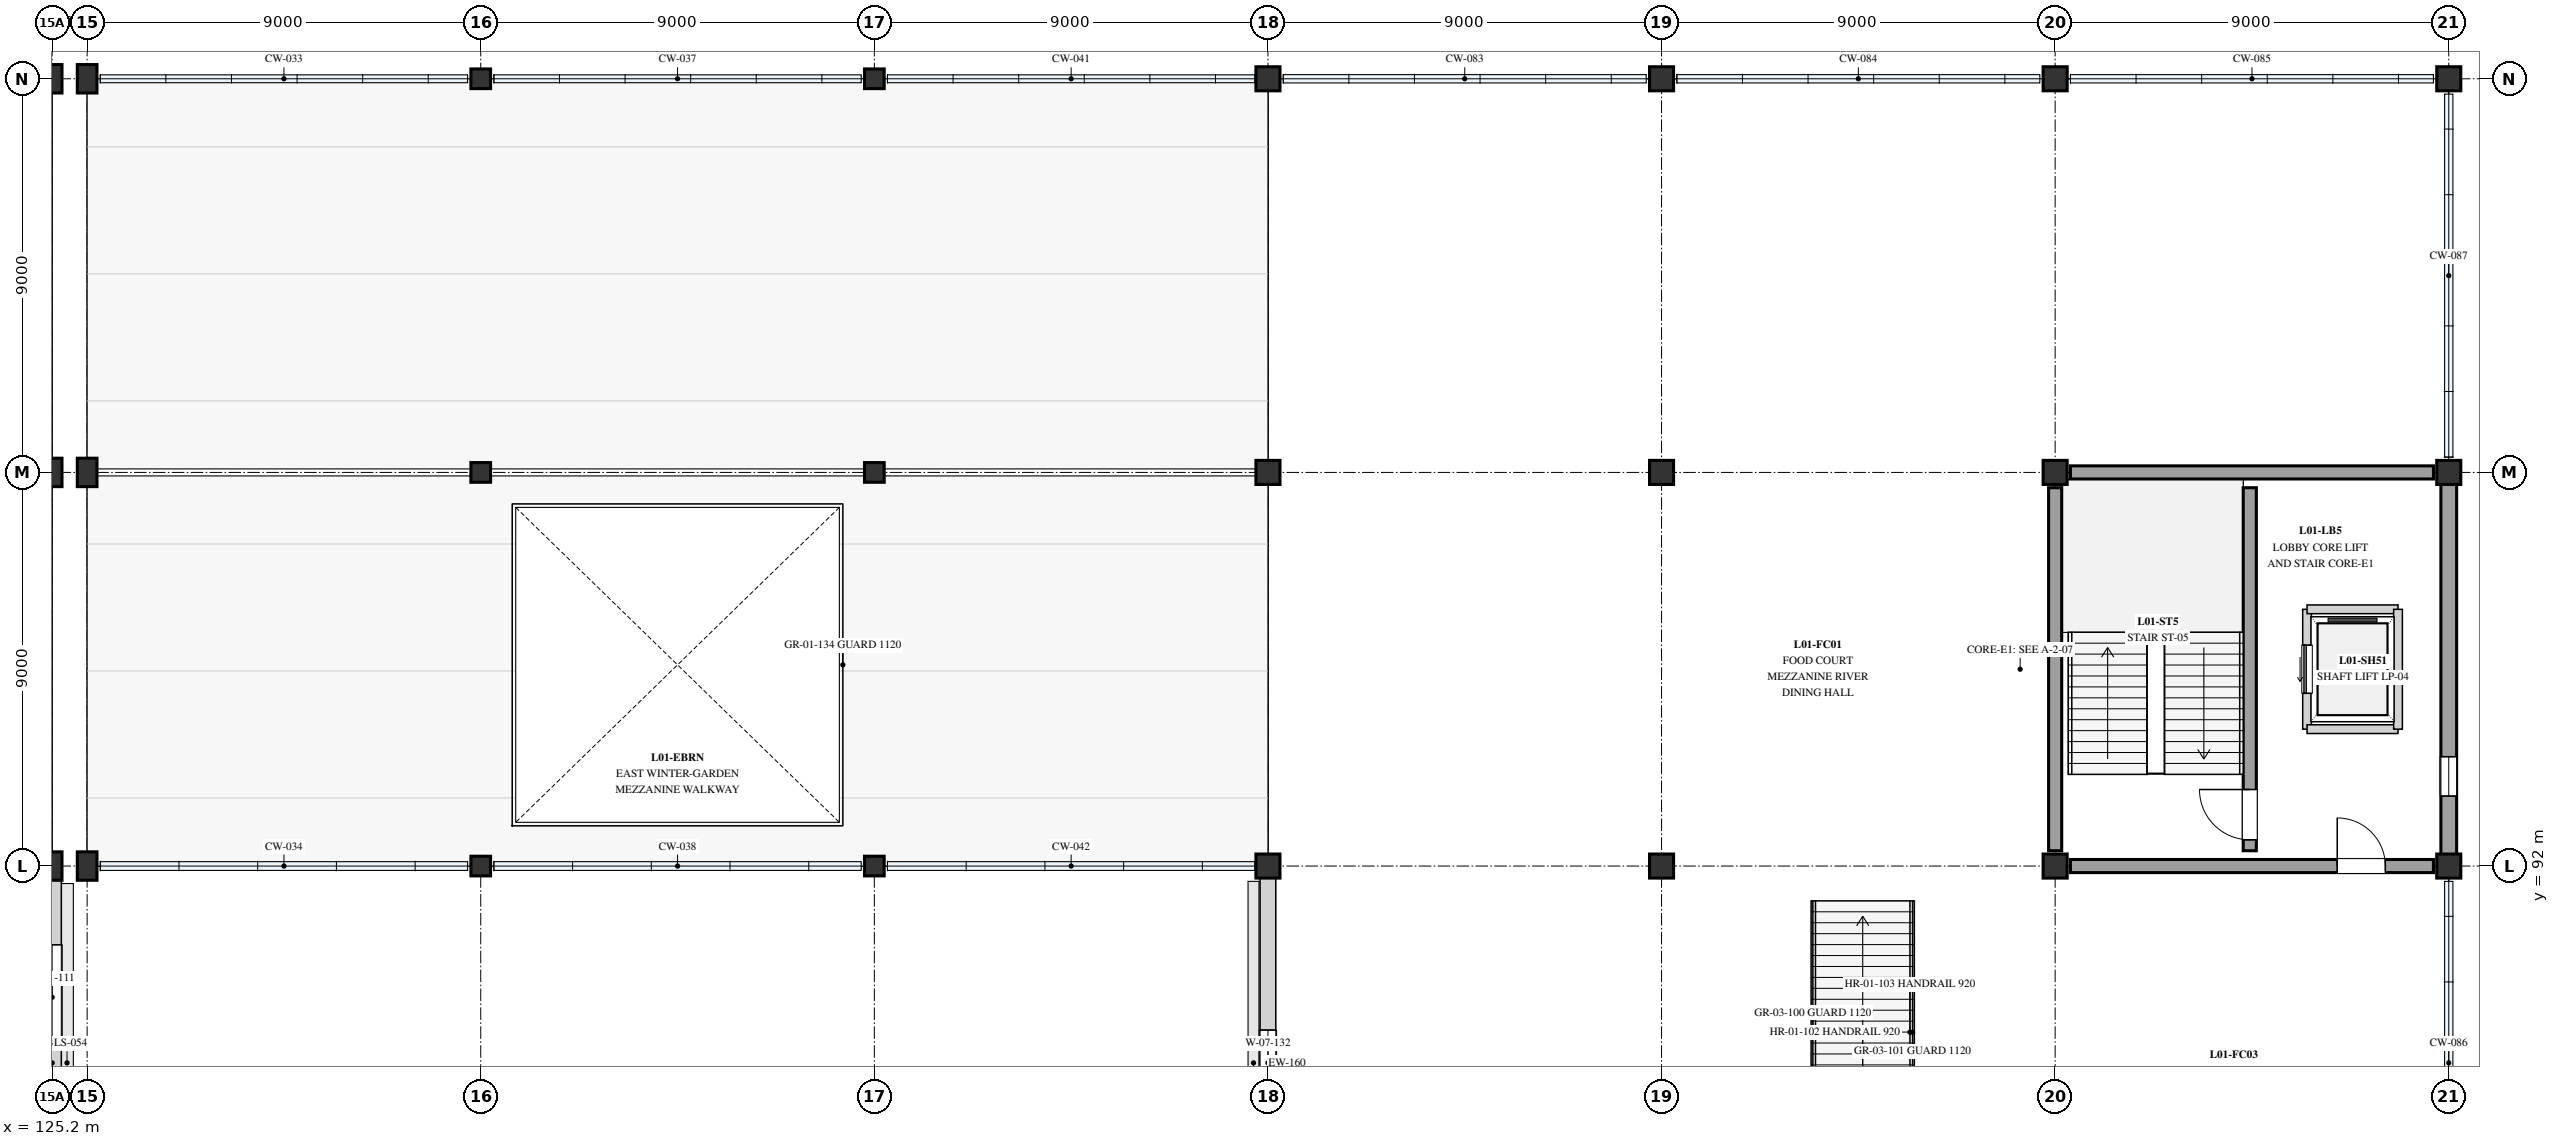
"""IFC4 building model, lengths in metres.
Left out: names, types, materials, properties, quantities, classifications, styles, units other than length and angle.
Written with IfcOpenShell. Run it as: python <this file> out.ifc"""

import sys

from ifc_helpers import new_model, si_unit, direction, frame, frame_2d, origin, origin_2d, place, context, subcontext, project, spatial, rectangle, extrude, element, fill, save


model = new_model("IFC4")
c1 = context("Model", 3, precision=1e-05, world=origin(), true_north=direction((0.0, 1.0)))
c2 = subcontext(c1, "Body", "Model", "MODEL_VIEW")
j1 = project(units=[si_unit("LENGTHUNIT", "METRE"), si_unit("PLANEANGLEUNIT", "RADIAN")], contexts=[c1])
p1 = place(None, origin())
s1 = spatial("IfcSite", under=j1, at=p1, CompositionType="ELEMENT")
p2 = place(p1, origin())
s2 = spatial("IfcBuilding", under=s1, at=p2, CompositionType="ELEMENT")
p3 = place(p2, frame((0.0, 0.0, 4.5)))
s3 = spatial("IfcBuildingStorey", under=s2, at=p3, CompositionType="ELEMENT", Elevation=4.5)
p4 = place(p3, frame((125.2, 92.0, 0.0), z_axis=(0.0, 0.0, 1.0), x_axis=(1.0, 0.0, 0.0)))
e1 = element("IfcColumn", 1, at=p4, inside=s3, PredefinedType="COLUMN", context=c2, shape_type="SweptSolid", body=[
    extrude(rectangle(XDim=0.45, YDim=0.65, at=origin_2d()), origin(), (0.0, 0.0, 1.0), 3.9),
])
p5 = place(p3, frame((125.2, 101.0, 0.0), z_axis=(0.0, 0.0, 1.0), x_axis=(1.0, 0.0, 0.0)))
e2 = element("IfcColumn", 2, at=p5, inside=s3, PredefinedType="COLUMN", context=c2, shape_type="SweptSolid", body=[
    extrude(rectangle(XDim=0.45, YDim=0.65, at=origin_2d()), origin(), (0.0, 0.0, 1.0), 5.71),
])
for number, where, z_axis, x_axis in (
    (3, (125.2, 110.0, 0.0), (0.0, 0.0, 1.0), (1.0, 0.0, 0.0)),
    (4, (126.0, 92.0, 0.0), (0.0, 0.0, 1.0), (1.0, 0.0, 0.0)),
):
    element("IfcColumn", number, at=place(p3, frame(where, z_axis=z_axis, x_axis=x_axis)), inside=s3, PredefinedType="COLUMN", context=c2, shape_type="SweptSolid", body=[
        extrude(rectangle(XDim=0.45, YDim=0.65, at=origin_2d()), origin(), (0.0, 0.0, 1.0), 3.71),
    ])
p6 = place(p3, frame((126.0, 101.0, 0.0), z_axis=(0.0, 0.0, 1.0), x_axis=(1.0, 0.0, 0.0)))
e5 = element("IfcColumn", 5, at=p6, inside=s3, PredefinedType="COLUMN", context=c2, shape_type="SweptSolid", body=[
    extrude(rectangle(XDim=0.45, YDim=0.65, at=origin_2d()), origin(), (0.0, 0.0, 1.0), 5.71),
])
p7 = place(p3, frame((126.0, 110.0, 0.0), z_axis=(0.0, 0.0, 1.0), x_axis=(1.0, 0.0, 0.0)))
e6 = element("IfcColumn", 6, at=p7, inside=s3, PredefinedType="COLUMN", context=c2, shape_type="SweptSolid", body=[
    extrude(rectangle(XDim=0.45, YDim=0.65, at=origin_2d()), origin(), (0.0, 0.0, 1.0), 3.71),
])
p8 = place(p3, frame((135.0, 92.0, 0.0), z_axis=(0.0, 0.0, 1.0), x_axis=(1.0, 0.0, 0.0)))
e7 = element("IfcColumn", 7, at=p8, inside=s3, PredefinedType="COLUMN", context=c2, shape_type="SweptSolid", body=[
    extrude(rectangle(XDim=0.45, YDim=0.45, at=origin_2d()), origin(), (0.0, 0.0, 1.0), 3.71),
])
p9 = place(p3, frame((135.0, 101.0, 0.0), z_axis=(0.0, 0.0, 1.0), x_axis=(1.0, 0.0, 0.0)))
e8 = element("IfcColumn", 8, at=p9, inside=s3, PredefinedType="COLUMN", context=c2, shape_type="SweptSolid", body=[
    extrude(rectangle(XDim=0.45, YDim=0.45, at=origin_2d()), origin(), (0.0, 0.0, 1.0), 5.71),
])
for number, where, z_axis, x_axis in (
    (9, (135.0, 110.0, 0.0), (0.0, 0.0, 1.0), (1.0, 0.0, 0.0)),
    (10, (144.0, 92.0, 0.0), (0.0, 0.0, 1.0), (1.0, 0.0, 0.0)),
):
    element("IfcColumn", number, at=place(p3, frame(where, z_axis=z_axis, x_axis=x_axis)), inside=s3, PredefinedType="COLUMN", context=c2, shape_type="SweptSolid", body=[
        extrude(rectangle(XDim=0.45, YDim=0.45, at=origin_2d()), origin(), (0.0, 0.0, 1.0), 3.71),
    ])
p10 = place(p3, frame((144.0, 101.0, 0.0), z_axis=(0.0, 0.0, 1.0), x_axis=(1.0, 0.0, 0.0)))
e11 = element("IfcColumn", 11, at=p10, inside=s3, PredefinedType="COLUMN", context=c2, shape_type="SweptSolid", body=[
    extrude(rectangle(XDim=0.45, YDim=0.45, at=origin_2d()), origin(), (0.0, 0.0, 1.0), 5.71),
])
p11 = place(p3, frame((144.0, 110.0, 0.0), z_axis=(0.0, 0.0, 1.0), x_axis=(1.0, 0.0, 0.0)))
e12 = element("IfcColumn", 12, at=p11, inside=s3, PredefinedType="COLUMN", context=c2, shape_type="SweptSolid", body=[
    extrude(rectangle(XDim=0.45, YDim=0.45, at=origin_2d()), origin(), (0.0, 0.0, 1.0), 3.71),
])
for number, where, z_axis, x_axis in (
    (13, (153.0, 92.0, 0.0), (0.0, 0.0, 1.0), (1.0, 0.0, 0.0)),
    (14, (153.0, 101.0, 0.0), (0.0, 0.0, 1.0), (1.0, 0.0, 0.0)),
    (15, (153.0, 110.0, 0.0), (0.0, 0.0, 1.0), (1.0, 0.0, 0.0)),
    (16, (162.0, 92.0, 0.0), (0.0, 0.0, 1.0), (1.0, 0.0, 0.0)),
    (17, (162.0, 101.0, 0.0), (0.0, 0.0, 1.0), (1.0, 0.0, 0.0)),
    (18, (162.0, 110.0, 0.0), (0.0, 0.0, 1.0), (1.0, 0.0, 0.0)),
    (19, (171.0, 92.0, 0.0), (0.0, 0.0, 1.0), (1.0, 0.0, 0.0)),
    (20, (171.0, 101.0, 0.0), (0.0, 0.0, 1.0), (1.0, 0.0, 0.0)),
    (21, (171.0, 110.0, 0.0), (0.0, 0.0, 1.0), (1.0, 0.0, 0.0)),
    (22, (180.0, 92.0, 0.0), (0.0, 0.0, 1.0), (1.0, 0.0, 0.0)),
    (23, (180.0, 101.0, 0.0), (0.0, 0.0, 1.0), (1.0, 0.0, 0.0)),
    (24, (180.0, 110.0, 0.0), (0.0, 0.0, 1.0), (1.0, 0.0, 0.0)),
):
    element("IfcColumn", number, at=place(p3, frame(where, z_axis=z_axis, x_axis=x_axis)), inside=s3, PredefinedType="COLUMN", context=c2, shape_type="SweptSolid", body=[
        extrude(rectangle(XDim=0.55, YDim=0.55, at=origin_2d()), origin(), (0.0, 0.0, 1.0), 3.9),
    ])
p12 = place(p3, frame((125.2, 83.0, 0.0), z_axis=(0.0, 0.0, 1.0), x_axis=(0.0, 1.0, 0.0)))
e25 = element("IfcWall", 25, at=p12, inside=s3, PredefinedType="STANDARD", context=c2, shape_type="SweptSolid", body=[
    extrude(rectangle(XDim=9.0, YDim=0.42, at=frame_2d((4.5, 0.0))), origin(), (0.0, 0.0, 1.0), 2.79),
])
p13 = place(p12, frame((1.8, 0.0, 0.35)))
e26 = element("IfcOpeningElement", 26, at=p13, cuts=e25, PredefinedType="OPENING", context=c2, shape_type="SweptSolid", body=[
    extrude(rectangle(XDim=2.4, YDim=2.26, at=frame_2d((1.2, 1.13))), frame((0.0, 0.22, 0.0), z_axis=(0.0, -1.0, 0.0), x_axis=(1.0, 0.0, 0.0)), (0.0, 0.0, 1.0), 0.44),
])
p14 = place(p12, frame((4.8, 0.0, 0.35)))
e27 = element("IfcOpeningElement", 27, at=p14, cuts=e25, PredefinedType="OPENING", context=c2, shape_type="SweptSolid", body=[
    extrude(rectangle(XDim=2.4, YDim=2.26, at=frame_2d((1.2, 1.13))), frame((0.0, 0.22, 0.0), z_axis=(0.0, -1.0, 0.0), x_axis=(1.0, 0.0, 0.0)), (0.0, 0.0, 1.0), 0.44),
])
p15 = place(p3, frame((153.0, 83.0, 0.0), z_axis=(0.0, 0.0, 1.0), x_axis=(0.0, 1.0, 0.0)))
e28 = element("IfcWall", 28, at=p15, inside=s3, PredefinedType="STANDARD", context=c2, shape_type="SweptSolid", body=[
    extrude(rectangle(XDim=9.0, YDim=0.36, at=frame_2d((4.5, 0.0))), origin(), (0.0, 0.0, 1.0), 2.76),
])
p16 = place(p15, frame((3.75, 0.0, 0.37)))
e29 = element("IfcOpeningElement", 29, at=p16, cuts=e28, PredefinedType="OPENING", context=c2, shape_type="SweptSolid", body=[
    extrude(rectangle(XDim=1.5, YDim=2.2, at=frame_2d((0.75, 1.1))), frame((0.0, 0.19, 0.0), z_axis=(0.0, -1.0, 0.0), x_axis=(1.0, 0.0, 0.0)), (0.0, 0.0, 1.0), 0.38),
])
p17 = place(p3, frame((180.0, 101.0, 0.0), z_axis=(0.0, 0.0, 1.0), x_axis=(0.0, -1.0, 0.0)))
e30 = element("IfcWall", 30, at=p17, inside=s3, PredefinedType="STANDARD", context=c2, shape_type="SweptSolid", body=[
    extrude(rectangle(XDim=9.0, YDim=0.36, at=frame_2d((4.5, 0.0))), origin(), (0.0, 0.0, 1.0), 3.63),
])
p18 = place(p17, frame((6.5, 0.0, 0.35)))
e31 = element("IfcOpeningElement", 31, at=p18, cuts=e30, PredefinedType="OPENING", context=c2, shape_type="SweptSolid", body=[
    extrude(rectangle(XDim=0.9, YDim=2.22, at=frame_2d((0.45, 1.11))), frame((0.0, 0.19, 0.0), z_axis=(0.0, -1.0, 0.0), x_axis=(1.0, 0.0, 0.0)), (0.0, 0.0, 1.0), 0.38),
])
p19 = place(p3, frame((175.45, 92.35, 0.0), z_axis=(0.0, 0.0, 1.0), x_axis=(0.0, 1.0, 0.0)))
e32 = element("IfcWall", 32, at=p19, inside=s3, PredefinedType="SHEAR", context=c2, shape_type="SweptSolid", body=[
    extrude(rectangle(XDim=8.3, YDim=0.3, at=frame_2d((4.15, 0.0))), origin(), (0.0, 0.0, 1.0), 3.62),
])
p20 = place(p19, frame((0.25, 0.0, 0.0)))
e33 = element("IfcOpeningElement", 33, at=p20, cuts=e32, PredefinedType="OPENING", context=c2, shape_type="SweptSolid", body=[
    extrude(rectangle(XDim=1.15, YDim=2.15, at=frame_2d((0.575, 1.075))), frame((0.0, 0.16, 0.0), z_axis=(0.0, -1.0, 0.0), x_axis=(1.0, 0.0, 0.0)), (0.0, 0.0, 1.0), 0.32),
])
p21 = place(p3, frame((171.0, 92.35, 0.0), z_axis=(0.0, 0.0, 1.0), x_axis=(0.0, 1.0, 0.0)))
e34 = element("IfcWall", 34, at=p21, inside=s3, PredefinedType="SHEAR", context=c2, shape_type="SweptSolid", body=[
    extrude(rectangle(XDim=8.3, YDim=0.3, at=frame_2d((4.15, 0.0))), origin(), (0.0, 0.0, 1.0), 3.62),
])
p22 = place(p3, frame((171.35, 92.0, 0.0), z_axis=(0.0, 0.0, 1.0), x_axis=(1.0, 0.0, 0.0)))
e35 = element("IfcWall", 35, at=p22, inside=s3, PredefinedType="SHEAR", context=c2, shape_type="SweptSolid", body=[
    extrude(rectangle(XDim=8.3, YDim=0.3, at=frame_2d((4.15, 0.0))), origin(), (0.0, 0.0, 1.0), 3.62),
])
p23 = place(p22, frame((6.1, 0.0, 0.0)))
e36 = element("IfcOpeningElement", 36, at=p23, cuts=e35, PredefinedType="OPENING", context=c2, shape_type="SweptSolid", body=[
    extrude(rectangle(XDim=1.1, YDim=2.1, at=frame_2d((0.55, 1.05))), frame((0.0, 0.16, 0.0), z_axis=(0.0, -1.0, 0.0), x_axis=(1.0, 0.0, 0.0)), (0.0, 0.0, 1.0), 0.32),
])
p24 = place(p3, frame((171.35, 101.0, 0.0), z_axis=(0.0, 0.0, 1.0), x_axis=(1.0, 0.0, 0.0)))
e37 = element("IfcWall", 37, at=p24, inside=s3, PredefinedType="SHEAR", context=c2, shape_type="SweptSolid", body=[
    extrude(rectangle(XDim=8.3, YDim=0.3, at=frame_2d((4.15, 0.0))), origin(), (0.0, 0.0, 1.0), 3.62),
])
p25 = place(p3, frame((176.76, 95.13, 0.0), z_axis=(0.0, 0.0, 1.0), x_axis=(0.0, 1.0, 0.0)))
e38 = element("IfcWall", 38, at=p25, inside=s3, PredefinedType="SOLIDWALL", context=c2, shape_type="SweptSolid", body=[
    extrude(rectangle(XDim=2.74, YDim=0.2, at=frame_2d((1.37, 0.0))), origin(), (0.0, 0.0, 1.0), 2.65),
])
p26 = place(p25, frame((0.82, 0.0, 0.0)))
e39 = element("IfcOpeningElement", 39, at=p26, cuts=e38, PredefinedType="OPENING", context=c2, shape_type="SweptSolid", body=[
    extrude(rectangle(XDim=1.1, YDim=2.1, at=frame_2d((0.55, 1.05))), frame((0.0, 0.11, 0.0), z_axis=(0.0, -1.0, 0.0), x_axis=(1.0, 0.0, 0.0)), (0.0, 0.0, 1.0), 0.22),
])
for number, where, z_axis, x_axis in (
    (40, (176.76, 95.13, 0.0), (0.0, 0.0, 1.0), (1.0, 0.0, 0.0)),
    (41, (176.76, 97.87, 0.0), (0.0, 0.0, 1.0), (1.0, 0.0, 0.0)),
):
    element("IfcWall", number, at=place(p3, frame(where, z_axis=z_axis, x_axis=x_axis)), inside=s3, PredefinedType="SOLIDWALL", context=c2, shape_type="SweptSolid", body=[
        extrude(rectangle(XDim=2.08, YDim=0.2, at=frame_2d((1.04, 0.0))), origin(), (0.0, 0.0, 1.0), 2.65),
    ])
p27 = place(p3, frame((178.84, 95.13, 0.0), z_axis=(0.0, 0.0, 1.0), x_axis=(0.0, 1.0, 0.0)))
e42 = element("IfcWall", 42, at=p27, inside=s3, PredefinedType="SOLIDWALL", context=c2, shape_type="SweptSolid", body=[
    extrude(rectangle(XDim=2.74, YDim=0.2, at=frame_2d((1.37, 0.0))), origin(), (0.0, 0.0, 1.0), 2.65),
])
p28 = place(p14, origin())
e43 = element("IfcWindow", 43, at=p28, inside=s3, PartitioningType="SINGLE_PANEL", PredefinedType="WINDOW", context=c2, shape_type="SweptSolid", body=[
    extrude(rectangle(XDim=2.4, YDim=2.26, at=frame_2d((1.2, 1.13))), frame((0.0, 0.03, 0.0), z_axis=(0.0, -1.0, 0.0), x_axis=(1.0, 0.0, 0.0)), (0.0, 0.0, 1.0), 0.06),
])
fill(e27, e43)
p29 = place(p16, origin())
e44 = element("IfcWindow", 44, at=p29, inside=s3, PartitioningType="SINGLE_PANEL", PredefinedType="WINDOW", context=c2, shape_type="SweptSolid", body=[
    extrude(rectangle(XDim=1.5, YDim=2.2, at=frame_2d((0.75, 1.1))), frame((0.0, 0.03, 0.0), z_axis=(0.0, -1.0, 0.0), x_axis=(1.0, 0.0, 0.0)), (0.0, 0.0, 1.0), 0.06),
])
fill(e29, e44)
p30 = place(p18, origin())
e45 = element("IfcWindow", 45, at=p30, inside=s3, PartitioningType="SINGLE_PANEL", PredefinedType="WINDOW", context=c2, shape_type="SweptSolid", body=[
    extrude(rectangle(XDim=0.9, YDim=2.22, at=frame_2d((0.45, 1.11))), frame((0.0, 0.03, 0.0), z_axis=(0.0, -1.0, 0.0), x_axis=(1.0, 0.0, 0.0)), (0.0, 0.0, 1.0), 0.06),
])
fill(e31, e45)
p31 = place(p20, origin())
e46 = element("IfcDoor", 46, at=p31, inside=s3, OperationType="SINGLE_SWING_RIGHT", PredefinedType="DOOR", context=c2, shape_type="SweptSolid", body=[
    extrude(rectangle(XDim=1.15, YDim=2.15, at=frame_2d((0.575, 1.075))), frame((0.0, 0.025, 0.0), z_axis=(0.0, -1.0, 0.0), x_axis=(1.0, 0.0, 0.0)), (0.0, 0.0, 1.0), 0.05),
])
fill(e33, e46)
p32 = place(p23, origin())
e47 = element("IfcDoor", 47, at=p32, inside=s3, OperationType="SINGLE_SWING_LEFT", PredefinedType="DOOR", context=c2, shape_type="SweptSolid", body=[
    extrude(rectangle(XDim=1.1, YDim=2.1, at=frame_2d((0.55, 1.05))), frame((0.0, 0.025, 0.0), z_axis=(0.0, -1.0, 0.0), x_axis=(1.0, 0.0, 0.0)), (0.0, 0.0, 1.0), 0.05),
])
fill(e36, e47)
p33 = place(p26, origin())
e48 = element("IfcDoor", 48, at=p33, inside=s3, OperationType="SLIDING_TO_LEFT", PredefinedType="DOOR", context=c2, shape_type="SweptSolid", body=[
    extrude(rectangle(XDim=1.1, YDim=2.1, at=frame_2d((0.55, 1.05))), frame((0.0, 0.025, 0.0), z_axis=(0.0, -1.0, 0.0), x_axis=(1.0, 0.0, 0.0)), (0.0, 0.0, 1.0), 0.05),
])
fill(e39, e48)
save(model, sys.argv[1])
